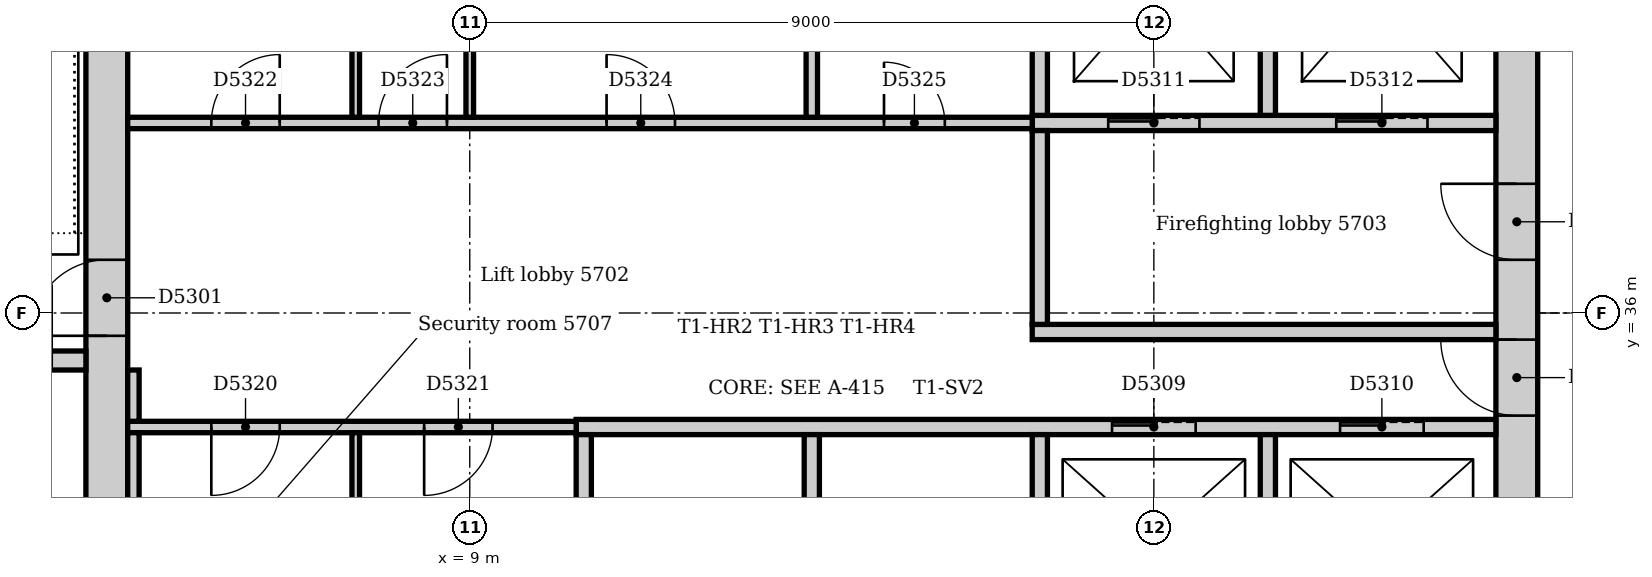
"""IFC4 building model, lengths in metres.
Left out: names, types, materials, properties, quantities, classifications, styles, units other than length and angle.
Written with IfcOpenShell. Run it as: python <this file> out.ifc"""

import sys

from ifc_helpers import new_model, si_unit, direction, frame, frame_2d, origin, place, context, subcontext, project, spatial, rectangle, extrude, element, fill, save


model = new_model("IFC4")
c1 = context("Model", 3, precision=1e-05, world=origin(), true_north=direction((0.0, 1.0)))
c2 = subcontext(c1, "Body", "Model", "MODEL_VIEW")
j1 = project(units=[si_unit("LENGTHUNIT", "METRE"), si_unit("PLANEANGLEUNIT", "RADIAN")], contexts=[c1])
p1 = place(None, origin())
s1 = spatial("IfcSite", under=j1, at=p1, CompositionType="ELEMENT")
p2 = place(p1, origin())
s2 = spatial("IfcBuilding", under=s1, at=p2, CompositionType="ELEMENT")
p3 = place(p2, frame((0.0, 0.0, 238.0)))
s3 = spatial("IfcBuildingStorey", under=s2, at=p3, CompositionType="ELEMENT", Elevation=238.0)
p4 = place(p3, frame((22.775, 31.5, 0.0), z_axis=(0.0, 0.0, 1.0), x_axis=(0.0, 1.0, 0.0)))
e1 = element("IfcWall", 1, at=p4, inside=s3, PredefinedType="SOLIDWALL", context=c2, shape_type="SweptSolid", body=[
    extrude(rectangle(XDim=10.5, YDim=0.55, at=frame_2d((5.25, 0.0))), origin(), (0.0, 0.0, 1.0), 4.0),
])
p5 = place(p4, frame((3.15, 0.0, 0.0)))
e2 = element("IfcOpeningElement", 2, at=p5, cuts=e1, PredefinedType="OPENING", context=c2, shape_type="SweptSolid", body=[
    extrude(rectangle(XDim=1.0, YDim=2.1, at=frame_2d((0.5, 1.05))), frame((0.0, 0.285, 0.0), z_axis=(0.0, -1.0, 0.0), x_axis=(1.0, 0.0, 0.0)), (0.0, 0.0, 1.0), 0.57),
])
p6 = place(p4, frame((5.2, 0.0, 0.0)))
e3 = element("IfcOpeningElement", 3, at=p6, cuts=e1, PredefinedType="OPENING", context=c2, shape_type="SweptSolid", body=[
    extrude(rectangle(XDim=1.0, YDim=2.1, at=frame_2d((0.5, 1.05))), frame((0.0, 0.285, 0.0), z_axis=(0.0, -1.0, 0.0), x_axis=(1.0, 0.0, 0.0)), (0.0, 0.0, 1.0), 0.57),
])
p7 = place(p3, frame((4.225, 42.0, 0.0), z_axis=(0.0, 0.0, 1.0), x_axis=(0.0, -1.0, 0.0)))
e4 = element("IfcWall", 4, at=p7, inside=s3, PredefinedType="SOLIDWALL", context=c2, shape_type="SweptSolid", body=[
    extrude(rectangle(XDim=10.5, YDim=0.55, at=frame_2d((5.25, 0.0))), origin(), (0.0, 0.0, 1.0), 4.0),
])
p8 = place(p7, frame((5.3, 0.0, 0.0)))
e5 = element("IfcOpeningElement", 5, at=p8, cuts=e4, PredefinedType="OPENING", context=c2, shape_type="SweptSolid", body=[
    extrude(rectangle(XDim=1.0, YDim=2.1, at=frame_2d((0.5, 1.05))), frame((0.0, 0.285, 0.0), z_axis=(0.0, -1.0, 0.0), x_axis=(1.0, 0.0, 0.0)), (0.0, 0.0, 1.0), 0.57),
])
p9 = place(p3, frame((0.36, 35.375, 0.0), z_axis=(0.0, 0.0, 1.0), x_axis=(1.0, 0.0, 0.0)))
e6 = element("IfcWall", 6, at=p9, inside=s3, PredefinedType="SOLIDWALL", context=c2, shape_type="SweptSolid", body=[
    extrude(rectangle(XDim=3.59, YDim=0.25, at=frame_2d((1.795, 0.0))), origin(), (0.0, 0.0, 1.0), 4.0),
])
p10 = place(p9, frame((2.14, 0.0, 0.0)))
e7 = element("IfcOpeningElement", 7, at=p10, cuts=e6, PredefinedType="OPENING", context=c2, shape_type="SweptSolid", body=[
    extrude(rectangle(XDim=1.0, YDim=2.1, at=frame_2d((0.5, 1.05))), frame((0.0, 0.135, 0.0), z_axis=(0.0, -1.0, 0.0), x_axis=(1.0, 0.0, 0.0)), (0.0, 0.0, 1.0), 0.27),
])
p11 = place(p3, frame((16.4, 35.75, 0.0), z_axis=(0.0, 0.0, 1.0), x_axis=(1.0, 0.0, 0.0)))
e8 = element("IfcWall", 8, at=p11, inside=s3, PredefinedType="PARTITIONING", context=c2, shape_type="SweptSolid", body=[
    extrude(rectangle(XDim=6.1, YDim=0.2, at=frame_2d((3.05, 0.0))), origin(), (0.0, 0.0, 1.0), 3.7),
])
p12 = place(p3, frame((16.4, 38.5, 0.0), z_axis=(0.0, 0.0, 1.0), x_axis=(1.0, 0.0, 0.0)))
e9 = element("IfcWall", 9, at=p12, inside=s3, PredefinedType="PARTITIONING", context=c2, shape_type="SweptSolid", body=[
    extrude(rectangle(XDim=6.1, YDim=0.2, at=frame_2d((3.05, 0.0))), origin(), (0.0, 0.0, 1.0), 3.7),
])
p13 = place(p12, frame((1.0, 0.0, 0.0)))
e10 = element("IfcOpeningElement", 10, at=p13, cuts=e9, PredefinedType="OPENING", context=c2, shape_type="SweptSolid", body=[
    extrude(rectangle(XDim=1.2, YDim=2.1, at=frame_2d((0.6, 1.05))), frame((0.0, 0.11, 0.0), z_axis=(0.0, -1.0, 0.0), x_axis=(1.0, 0.0, 0.0)), (0.0, 0.0, 1.0), 0.22),
])
p14 = place(p12, frame((4.0, 0.0, 0.0)))
e11 = element("IfcOpeningElement", 11, at=p14, cuts=e9, PredefinedType="OPENING", context=c2, shape_type="SweptSolid", body=[
    extrude(rectangle(XDim=1.2, YDim=2.1, at=frame_2d((0.6, 1.05))), frame((0.0, 0.11, 0.0), z_axis=(0.0, -1.0, 0.0), x_axis=(1.0, 0.0, 0.0)), (0.0, 0.0, 1.0), 0.22),
])
p15 = place(p3, frame((16.5, 35.85, 0.0), z_axis=(0.0, 0.0, 1.0), x_axis=(0.0, 1.0, 0.0)))
e12 = element("IfcWall", 12, at=p15, inside=s3, PredefinedType="PARTITIONING", context=c2, shape_type="SweptSolid", body=[
    extrude(rectangle(XDim=2.55, YDim=0.2, at=frame_2d((1.275, 0.0))), origin(), (0.0, 0.0, 1.0), 3.7),
])
p16 = place(p3, frame((10.4, 34.5, 0.0), z_axis=(0.0, 0.0, 1.0), x_axis=(1.0, 0.0, 0.0)))
e13 = element("IfcWall", 13, at=p16, inside=s3, PredefinedType="PARTITIONING", context=c2, shape_type="SweptSolid", body=[
    extrude(rectangle(XDim=12.1, YDim=0.2, at=frame_2d((6.05, 0.0))), origin(), (0.0, 0.0, 1.0), 3.7),
])
p17 = place(p16, frame((7.05, 0.0, 0.0)))
e14 = element("IfcOpeningElement", 14, at=p17, cuts=e13, PredefinedType="OPENING", context=c2, shape_type="SweptSolid", body=[
    extrude(rectangle(XDim=1.1, YDim=2.1, at=frame_2d((0.55, 1.05))), frame((0.0, 0.11, 0.0), z_axis=(0.0, -1.0, 0.0), x_axis=(1.0, 0.0, 0.0)), (0.0, 0.0, 1.0), 0.22),
])
p18 = place(p16, frame((10.05, 0.0, 0.0)))
e15 = element("IfcOpeningElement", 15, at=p18, cuts=e13, PredefinedType="OPENING", context=c2, shape_type="SweptSolid", body=[
    extrude(rectangle(XDim=1.1, YDim=2.1, at=frame_2d((0.55, 1.05))), frame((0.0, 0.11, 0.0), z_axis=(0.0, -1.0, 0.0), x_axis=(1.0, 0.0, 0.0)), (0.0, 0.0, 1.0), 0.22),
])
for number, where, z_axis, x_axis in (
    (16, (10.5, 31.75, 0.0), (0.0, 0.0, 1.0), (0.0, 1.0, 0.0)),
    (17, (13.5, 31.75, 0.0), (0.0, 0.0, 1.0), (0.0, 1.0, 0.0)),
    (18, (16.5, 31.75, 0.0), (0.0, 0.0, 1.0), (0.0, 1.0, 0.0)),
    (19, (19.5, 31.75, 0.0), (0.0, 0.0, 1.0), (0.0, 1.0, 0.0)),
):
    element("IfcWall", number, at=place(p3, frame(where, z_axis=z_axis, x_axis=x_axis)), inside=s3, PredefinedType="PARTITIONING", context=c2, shape_type="SweptSolid", body=[
        extrude(rectangle(XDim=2.65, YDim=0.2, at=frame_2d((1.325, 0.0))), origin(), (0.0, 0.0, 1.0), 3.7),
    ])
for number, where, z_axis, x_axis in (
    (20, (16.5, 38.6, 0.0), (0.0, 0.0, 1.0), (0.0, 1.0, 0.0)),
    (21, (19.5, 38.6, 0.0), (0.0, 0.0, 1.0), (0.0, 1.0, 0.0)),
):
    element("IfcWall", number, at=place(p3, frame(where, z_axis=z_axis, x_axis=x_axis)), inside=s3, PredefinedType="PARTITIONING", context=c2, shape_type="SweptSolid", body=[
        extrude(rectangle(XDim=3.4, YDim=0.2, at=frame_2d((1.7, 0.0))), origin(), (0.0, 0.0, 1.0), 3.7),
    ])
p19 = place(p3, frame((4.5, 38.5, 0.0), z_axis=(0.0, 0.0, 1.0), x_axis=(1.0, 0.0, 0.0)))
e22 = element("IfcWall", 22, at=p19, inside=s3, PredefinedType="PARTITIONING", context=c2, shape_type="SweptSolid", body=[
    extrude(rectangle(XDim=11.9, YDim=0.15, at=frame_2d((5.95, 0.0))), origin(), (0.0, 0.0, 1.0), 3.7),
])
p20 = place(p19, frame((1.1, 0.0, 0.0)))
e23 = element("IfcOpeningElement", 23, at=p20, cuts=e22, PredefinedType="OPENING", context=c2, shape_type="SweptSolid", body=[
    extrude(rectangle(XDim=0.9, YDim=2.1, at=frame_2d((0.45, 1.05))), frame((0.0, 0.085, 0.0), z_axis=(0.0, -1.0, 0.0), x_axis=(1.0, 0.0, 0.0)), (0.0, 0.0, 1.0), 0.17),
])
p21 = place(p19, frame((3.3, 0.0, 0.0)))
e24 = element("IfcOpeningElement", 24, at=p21, cuts=e22, PredefinedType="OPENING", context=c2, shape_type="SweptSolid", body=[
    extrude(rectangle(XDim=0.9, YDim=2.1, at=frame_2d((0.45, 1.05))), frame((0.0, 0.085, 0.0), z_axis=(0.0, -1.0, 0.0), x_axis=(1.0, 0.0, 0.0)), (0.0, 0.0, 1.0), 0.17),
])
p22 = place(p19, frame((6.3, 0.0, 0.0)))
e25 = element("IfcOpeningElement", 25, at=p22, cuts=e22, PredefinedType="OPENING", context=c2, shape_type="SweptSolid", body=[
    extrude(rectangle(XDim=0.9, YDim=2.1, at=frame_2d((0.45, 1.05))), frame((0.0, 0.085, 0.0), z_axis=(0.0, -1.0, 0.0), x_axis=(1.0, 0.0, 0.0)), (0.0, 0.0, 1.0), 0.17),
])
p23 = place(p19, frame((9.95, 0.0, 0.0)))
e26 = element("IfcOpeningElement", 26, at=p23, cuts=e22, PredefinedType="OPENING", context=c2, shape_type="SweptSolid", body=[
    extrude(rectangle(XDim=0.8, YDim=2.1, at=frame_2d((0.4, 1.05))), frame((0.0, 0.085, 0.0), z_axis=(0.0, -1.0, 0.0), x_axis=(1.0, 0.0, 0.0)), (0.0, 0.0, 1.0), 0.17),
])
p24 = place(p3, frame((4.5, 34.5, 0.0), z_axis=(0.0, 0.0, 1.0), x_axis=(1.0, 0.0, 0.0)))
e27 = element("IfcWall", 27, at=p24, inside=s3, PredefinedType="PARTITIONING", context=c2, shape_type="SweptSolid", body=[
    extrude(rectangle(XDim=5.9, YDim=0.15, at=frame_2d((2.95, 0.0))), origin(), (0.0, 0.0, 1.0), 3.7),
])
p25 = place(p24, frame((1.1, 0.0, 0.0)))
e28 = element("IfcOpeningElement", 28, at=p25, cuts=e27, PredefinedType="OPENING", context=c2, shape_type="SweptSolid", body=[
    extrude(rectangle(XDim=0.9, YDim=2.1, at=frame_2d((0.45, 1.05))), frame((0.0, 0.085, 0.0), z_axis=(0.0, -1.0, 0.0), x_axis=(1.0, 0.0, 0.0)), (0.0, 0.0, 1.0), 0.17),
])
p26 = place(p24, frame((3.9, 0.0, 0.0)))
e29 = element("IfcOpeningElement", 29, at=p26, cuts=e27, PredefinedType="OPENING", context=c2, shape_type="SweptSolid", body=[
    extrude(rectangle(XDim=0.9, YDim=2.1, at=frame_2d((0.45, 1.05))), frame((0.0, 0.085, 0.0), z_axis=(0.0, -1.0, 0.0), x_axis=(1.0, 0.0, 0.0)), (0.0, 0.0, 1.0), 0.17),
])
p27 = place(p3, frame((4.575, 34.575, 0.0), z_axis=(0.0, 0.0, 1.0), x_axis=(0.0, 1.0, 0.0)))
e30 = element("IfcWall", 30, at=p27, inside=s3, PredefinedType="PARTITIONING", context=c2, shape_type="SweptSolid", body=[
    extrude(rectangle(XDim=0.675, YDim=0.15, at=frame_2d((0.338, 0.0))), origin(), (0.0, 0.0, 1.0), 3.7),
])
p28 = place(p3, frame((4.575, 31.75, 0.0), z_axis=(0.0, 0.0, 1.0), x_axis=(0.0, 1.0, 0.0)))
e31 = element("IfcWall", 31, at=p28, inside=s3, PredefinedType="PARTITIONING", context=c2, shape_type="SweptSolid", body=[
    extrude(rectangle(XDim=2.675, YDim=0.15, at=frame_2d((1.337, 0.0))), origin(), (0.0, 0.0, 1.0), 3.7),
])
p29 = place(p3, frame((13.5, 38.575, 0.0), z_axis=(0.0, 0.0, 1.0), x_axis=(0.0, 1.0, 0.0)))
e32 = element("IfcWall", 32, at=p29, inside=s3, PredefinedType="PARTITIONING", context=c2, shape_type="SweptSolid", body=[
    extrude(rectangle(XDim=3.425, YDim=0.15, at=frame_2d((1.712, 0.0))), origin(), (0.0, 0.0, 1.0), 3.7),
])
for number, where, z_axis, x_axis in (
    (33, (7.5, 38.575, 0.0), (0.0, 0.0, 1.0), (0.0, 1.0, 0.0)),
    (34, (9.0, 38.575, 0.0), (0.0, 0.0, 1.0), (0.0, 1.0, 0.0)),
):
    element("IfcWall", number, at=place(p3, frame(where, z_axis=z_axis, x_axis=x_axis)), inside=s3, PredefinedType="PARTITIONING", context=c2, shape_type="SweptSolid", body=[
        extrude(rectangle(XDim=3.425, YDim=0.1, at=frame_2d((1.712, 0.0))), origin(), (0.0, 0.0, 1.0), 3.7),
    ])
p30 = place(p3, frame((7.5, 31.75, 0.0), z_axis=(0.0, 0.0, 1.0), x_axis=(0.0, 1.0, 0.0)))
e35 = element("IfcWall", 35, at=p30, inside=s3, PredefinedType="PARTITIONING", context=c2, shape_type="SweptSolid", body=[
    extrude(rectangle(XDim=2.675, YDim=0.1, at=frame_2d((1.337, 0.0))), origin(), (0.0, 0.0, 1.0), 3.7),
])
p31 = place(p8, frame((1.0, 0.0, 0.0), z_axis=(0.0, 0.0, 1.0), x_axis=(-1.0, 0.0, 0.0)))
e36 = element("IfcDoor", 36, at=p31, inside=s3, OperationType="SINGLE_SWING_LEFT", PredefinedType="DOOR", context=c2, shape_type="SweptSolid", body=[
    extrude(rectangle(XDim=1.0, YDim=2.1, at=frame_2d((0.5, 1.05))), frame((0.0, 0.025, 0.0), z_axis=(0.0, -1.0, 0.0), x_axis=(1.0, 0.0, 0.0)), (0.0, 0.0, 1.0), 0.05),
])
fill(e5, e36)
p32 = place(p17, origin())
e37 = element("IfcDoor", 37, at=p32, inside=s3, OperationType="SLIDING_TO_LEFT", PredefinedType="DOOR", context=c2, shape_type="SweptSolid", body=[
    extrude(rectangle(XDim=1.1, YDim=2.1, at=frame_2d((0.55, 1.05))), frame((0.0, 0.025, 0.0), z_axis=(0.0, -1.0, 0.0), x_axis=(1.0, 0.0, 0.0)), (0.0, 0.0, 1.0), 0.05),
])
fill(e14, e37)
p33 = place(p18, origin())
e38 = element("IfcDoor", 38, at=p33, inside=s3, OperationType="SLIDING_TO_LEFT", PredefinedType="DOOR", context=c2, shape_type="SweptSolid", body=[
    extrude(rectangle(XDim=1.1, YDim=2.1, at=frame_2d((0.55, 1.05))), frame((0.0, 0.025, 0.0), z_axis=(0.0, -1.0, 0.0), x_axis=(1.0, 0.0, 0.0)), (0.0, 0.0, 1.0), 0.05),
])
fill(e15, e38)
p34 = place(p13, origin())
e39 = element("IfcDoor", 39, at=p34, inside=s3, OperationType="SLIDING_TO_LEFT", PredefinedType="DOOR", context=c2, shape_type="SweptSolid", body=[
    extrude(rectangle(XDim=1.2, YDim=2.1, at=frame_2d((0.6, 1.05))), frame((0.0, 0.025, 0.0), z_axis=(0.0, -1.0, 0.0), x_axis=(1.0, 0.0, 0.0)), (0.0, 0.0, 1.0), 0.05),
])
fill(e10, e39)
p35 = place(p14, origin())
e40 = element("IfcDoor", 40, at=p35, inside=s3, OperationType="SLIDING_TO_LEFT", PredefinedType="DOOR", context=c2, shape_type="SweptSolid", body=[
    extrude(rectangle(XDim=1.2, YDim=2.1, at=frame_2d((0.6, 1.05))), frame((0.0, 0.025, 0.0), z_axis=(0.0, -1.0, 0.0), x_axis=(1.0, 0.0, 0.0)), (0.0, 0.0, 1.0), 0.05),
])
fill(e11, e40)
p36 = place(p5, origin())
e41 = element("IfcDoor", 41, at=p36, inside=s3, OperationType="SINGLE_SWING_RIGHT", PredefinedType="DOOR", context=c2, shape_type="SweptSolid", body=[
    extrude(rectangle(XDim=1.0, YDim=2.1, at=frame_2d((0.5, 1.05))), frame((0.0, 0.025, 0.0), z_axis=(0.0, -1.0, 0.0), x_axis=(1.0, 0.0, 0.0)), (0.0, 0.0, 1.0), 0.05),
])
fill(e2, e41)
p37 = place(p6, origin())
e42 = element("IfcDoor", 42, at=p37, inside=s3, OperationType="SINGLE_SWING_RIGHT", PredefinedType="DOOR", context=c2, shape_type="SweptSolid", body=[
    extrude(rectangle(XDim=1.0, YDim=2.1, at=frame_2d((0.5, 1.05))), frame((0.0, 0.025, 0.0), z_axis=(0.0, -1.0, 0.0), x_axis=(1.0, 0.0, 0.0)), (0.0, 0.0, 1.0), 0.05),
])
fill(e3, e42)
p38 = place(p25, frame((0.9, 0.0, 0.0), z_axis=(0.0, 0.0, 1.0), x_axis=(-1.0, 0.0, 0.0)))
e43 = element("IfcDoor", 43, at=p38, inside=s3, OperationType="SINGLE_SWING_RIGHT", PredefinedType="DOOR", context=c2, shape_type="SweptSolid", body=[
    extrude(rectangle(XDim=0.9, YDim=2.1, at=frame_2d((0.45, 1.05))), frame((0.0, 0.025, 0.0), z_axis=(0.0, -1.0, 0.0), x_axis=(1.0, 0.0, 0.0)), (0.0, 0.0, 1.0), 0.05),
])
fill(e28, e43)
p39 = place(p26, frame((0.9, 0.0, 0.0), z_axis=(0.0, 0.0, 1.0), x_axis=(-1.0, 0.0, 0.0)))
e44 = element("IfcDoor", 44, at=p39, inside=s3, OperationType="SINGLE_SWING_RIGHT", PredefinedType="DOOR", context=c2, shape_type="SweptSolid", body=[
    extrude(rectangle(XDim=0.9, YDim=2.1, at=frame_2d((0.45, 1.05))), frame((0.0, 0.025, 0.0), z_axis=(0.0, -1.0, 0.0), x_axis=(1.0, 0.0, 0.0)), (0.0, 0.0, 1.0), 0.05),
])
fill(e29, e44)
p40 = place(p20, origin())
e45 = element("IfcDoor", 45, at=p40, inside=s3, OperationType="SINGLE_SWING_RIGHT", PredefinedType="DOOR", context=c2, shape_type="SweptSolid", body=[
    extrude(rectangle(XDim=0.9, YDim=2.1, at=frame_2d((0.45, 1.05))), frame((0.0, 0.025, 0.0), z_axis=(0.0, -1.0, 0.0), x_axis=(1.0, 0.0, 0.0)), (0.0, 0.0, 1.0), 0.05),
])
fill(e23, e45)
p41 = place(p21, origin())
e46 = element("IfcDoor", 46, at=p41, inside=s3, OperationType="SINGLE_SWING_RIGHT", PredefinedType="DOOR", context=c2, shape_type="SweptSolid", body=[
    extrude(rectangle(XDim=0.9, YDim=2.1, at=frame_2d((0.45, 1.05))), frame((0.0, 0.025, 0.0), z_axis=(0.0, -1.0, 0.0), x_axis=(1.0, 0.0, 0.0)), (0.0, 0.0, 1.0), 0.05),
])
fill(e24, e46)
p42 = place(p22, origin())
e47 = element("IfcDoor", 47, at=p42, inside=s3, OperationType="SINGLE_SWING_LEFT", PredefinedType="DOOR", context=c2, shape_type="SweptSolid", body=[
    extrude(rectangle(XDim=0.9, YDim=2.1, at=frame_2d((0.45, 1.05))), frame((0.0, 0.025, 0.0), z_axis=(0.0, -1.0, 0.0), x_axis=(1.0, 0.0, 0.0)), (0.0, 0.0, 1.0), 0.05),
])
fill(e25, e47)
p43 = place(p23, origin())
e48 = element("IfcDoor", 48, at=p43, inside=s3, OperationType="SINGLE_SWING_LEFT", PredefinedType="DOOR", context=c2, shape_type="SweptSolid", body=[
    extrude(rectangle(XDim=0.8, YDim=2.1, at=frame_2d((0.4, 1.05))), frame((0.0, 0.025, 0.0), z_axis=(0.0, -1.0, 0.0), x_axis=(1.0, 0.0, 0.0)), (0.0, 0.0, 1.0), 0.05),
])
fill(e26, e48)
save(model, sys.argv[1])
